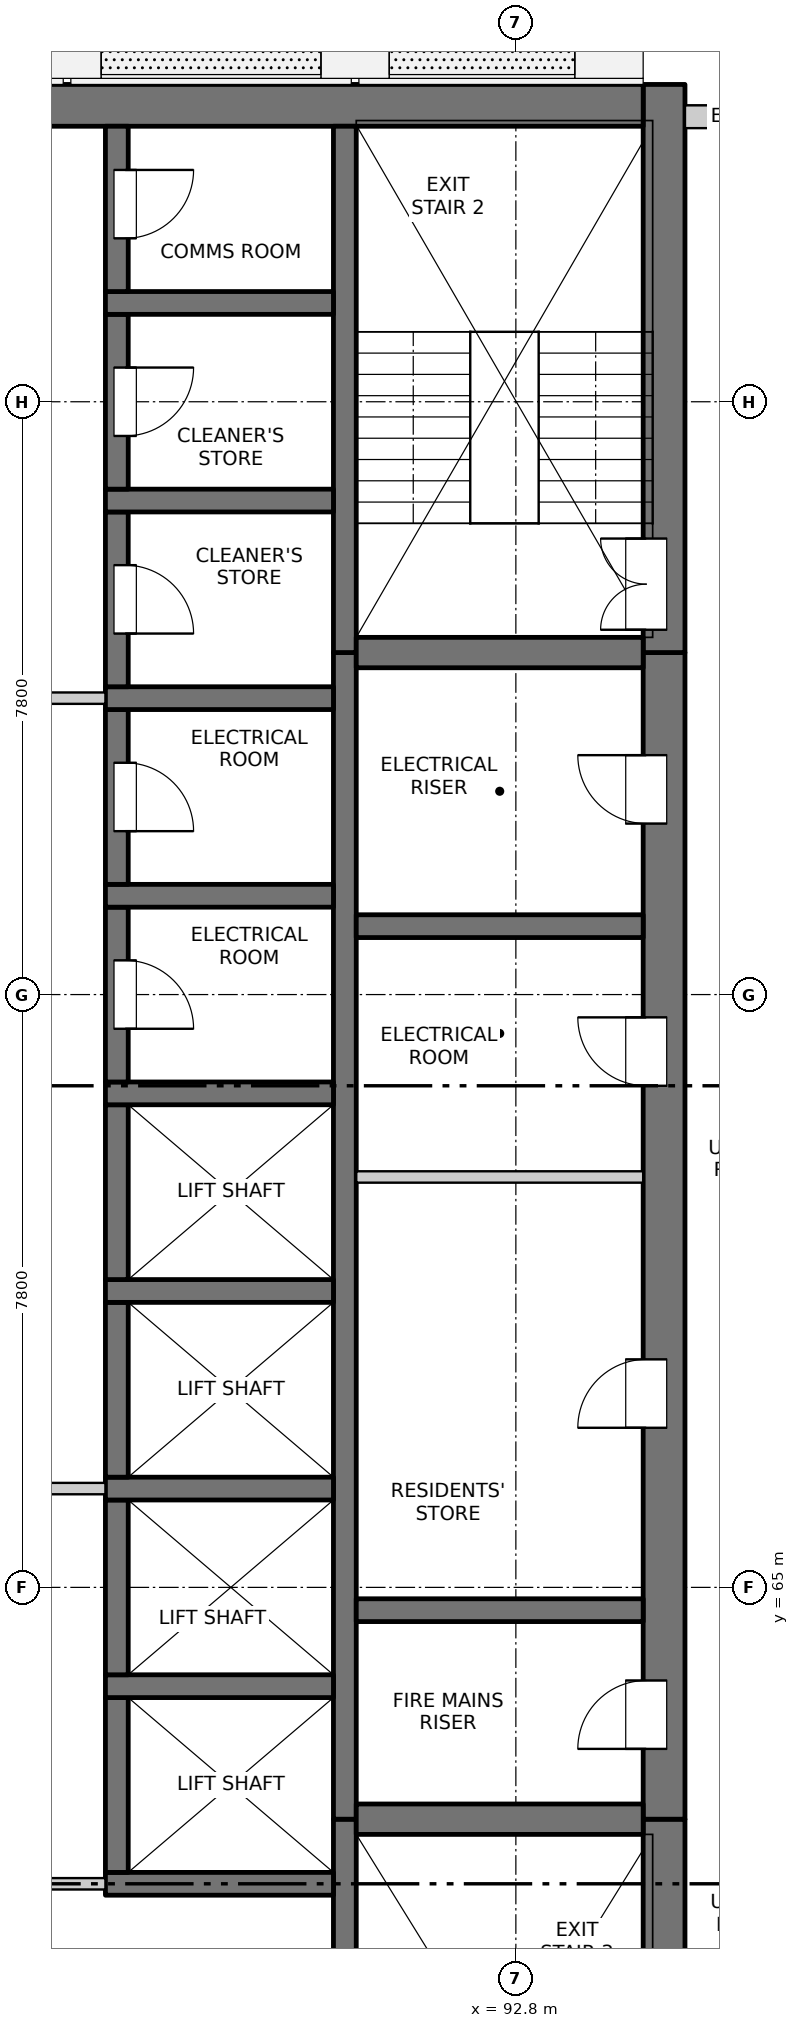
"""IFC4 building model, lengths in metres.
Left out: names, types, materials, properties, quantities, classifications, styles, units other than length and angle.
Written with IfcOpenShell. Run it as: python <this file> out.ifc"""

import sys

from ifc_helpers import new_model, si_unit, direction, frame, frame_2d, origin, place, context, subcontext, project, spatial, rectangle, extrude, element, fill, save


model = new_model("IFC4")
c1 = context("Model", 3, precision=1e-05, world=origin(), true_north=direction((0.0, 1.0)))
c2 = subcontext(c1, "Body", "Model", "MODEL_VIEW")
j1 = project(units=[si_unit("LENGTHUNIT", "METRE"), si_unit("PLANEANGLEUNIT", "RADIAN")], contexts=[c1])
p1 = place(None, origin())
s1 = spatial("IfcSite", under=j1, at=p1, CompositionType="ELEMENT")
p2 = place(p1, origin())
s2 = spatial("IfcBuilding", under=s1, at=p2, CompositionType="ELEMENT")
p3 = place(p2, frame((0.0, 0.0, 123.7)))
s3 = spatial("IfcBuildingStorey", under=s2, at=p3, CompositionType="ELEMENT", Elevation=123.7)
p4 = place(p3, frame((94.75, 54.975, -0.3), z_axis=(0.0, 0.0, 1.0), x_axis=(0.0, 1.0, 0.0)))
e1 = element("IfcWall", 1, at=p4, inside=s3, PredefinedType="SOLIDWALL", context=c2, shape_type="SweptSolid", body=[
    extrude(rectangle(XDim=6.975, YDim=0.55, at=frame_2d((3.487, 0.0))), origin(), (0.0, 0.0, 1.0), 3.45),
])
p5 = place(p4, frame((0.675, 0.0, 0.3)))
e2 = element("IfcOpeningElement", 2, at=p5, cuts=e1, PredefinedType="OPENING", context=c2, shape_type="SweptSolid", body=[
    extrude(rectangle(XDim=1.2, YDim=2.1, at=frame_2d((0.6, 1.05))), frame((0.0, 0.285, 0.0), z_axis=(0.0, -1.0, 0.0), x_axis=(1.0, 0.0, 0.0)), (0.0, 0.0, 1.0), 0.57),
])
p6 = place(p3, frame((94.75, 61.95, -0.3), z_axis=(0.0, 0.0, 1.0), x_axis=(0.0, 1.0, 0.0)))
e3 = element("IfcWall", 3, at=p6, inside=s3, PredefinedType="SOLIDWALL", context=c2, shape_type="SweptSolid", body=[
    extrude(rectangle(XDim=15.35, YDim=0.55, at=frame_2d((7.675, 0.0))), origin(), (0.0, 0.0, 1.0), 3.45),
])
p7 = place(p6, frame((0.925, 0.0, 0.3)))
e4 = element("IfcOpeningElement", 4, at=p7, cuts=e3, PredefinedType="OPENING", context=c2, shape_type="SweptSolid", body=[
    extrude(rectangle(XDim=0.9, YDim=2.1, at=frame_2d((0.45, 1.05))), frame((0.0, 0.285, 0.0), z_axis=(0.0, -1.0, 0.0), x_axis=(1.0, 0.0, 0.0)), (0.0, 0.0, 1.0), 0.57),
])
p8 = place(p6, frame((5.15, 0.0, 0.3)))
e5 = element("IfcOpeningElement", 5, at=p8, cuts=e3, PredefinedType="OPENING", context=c2, shape_type="SweptSolid", body=[
    extrude(rectangle(XDim=0.9, YDim=2.1, at=frame_2d((0.45, 1.05))), frame((0.0, 0.285, 0.0), z_axis=(0.0, -1.0, 0.0), x_axis=(1.0, 0.0, 0.0)), (0.0, 0.0, 1.0), 0.57),
])
p9 = place(p6, frame((9.65, 0.0, 0.3)))
e6 = element("IfcOpeningElement", 6, at=p9, cuts=e3, PredefinedType="OPENING", context=c2, shape_type="SweptSolid", body=[
    extrude(rectangle(XDim=0.9, YDim=2.1, at=frame_2d((0.45, 1.05))), frame((0.0, 0.285, 0.0), z_axis=(0.0, -1.0, 0.0), x_axis=(1.0, 0.0, 0.0)), (0.0, 0.0, 1.0), 0.57),
])
p10 = place(p6, frame((13.1, 0.0, 0.3)))
e7 = element("IfcOpeningElement", 7, at=p10, cuts=e3, PredefinedType="OPENING", context=c2, shape_type="SweptSolid", body=[
    extrude(rectangle(XDim=0.9, YDim=2.1, at=frame_2d((0.45, 1.05))), frame((0.0, 0.285, 0.0), z_axis=(0.0, -1.0, 0.0), x_axis=(1.0, 0.0, 0.0)), (0.0, 0.0, 1.0), 0.57),
])
p11 = place(p3, frame((94.75, 77.3, -0.3), z_axis=(0.0, 0.0, 1.0), x_axis=(0.0, 1.0, 0.0)))
e8 = element("IfcWall", 8, at=p11, inside=s3, PredefinedType="SOLIDWALL", context=c2, shape_type="SweptSolid", body=[
    extrude(rectangle(XDim=7.475, YDim=0.55, at=frame_2d((3.737, 0.0))), origin(), (0.0, 0.0, 1.0), 3.45),
])
p12 = place(p11, frame((0.3, 0.0, 0.3)))
e9 = element("IfcOpeningElement", 9, at=p12, cuts=e8, PredefinedType="OPENING", context=c2, shape_type="SweptSolid", body=[
    extrude(rectangle(XDim=1.2, YDim=2.1, at=frame_2d((0.6, 1.05))), frame((0.0, 0.285, 0.0), z_axis=(0.0, -1.0, 0.0), x_axis=(1.0, 0.0, 0.0)), (0.0, 0.0, 1.0), 0.57),
])
p13 = place(p3, frame((75.525, 84.5, -0.3), z_axis=(0.0, 0.0, 1.0), x_axis=(1.0, 0.0, 0.0)))
e10 = element("IfcWall", 10, at=p13, inside=s3, PredefinedType="SOLIDWALL", context=c2, shape_type="SweptSolid", body=[
    extrude(rectangle(XDim=18.95, YDim=0.55, at=frame_2d((9.475, 0.0))), origin(), (0.0, 0.0, 1.0), 3.45),
])
p14 = place(p3, frame((90.55, 55.525, -0.3), z_axis=(0.0, 0.0, 1.0), x_axis=(0.0, 1.0, 0.0)))
e11 = element("IfcWall", 11, at=p14, inside=s3, PredefinedType="SOLIDWALL", context=c2, shape_type="SweptSolid", body=[
    extrude(rectangle(XDim=6.425, YDim=0.3, at=frame_2d((3.212, 0.0))), origin(), (0.0, 0.0, 1.0), 3.45),
])
p15 = place(p3, frame((90.55, 61.95, -0.3), z_axis=(0.0, 0.0, 1.0), x_axis=(0.0, 1.0, 0.0)))
e12 = element("IfcWall", 12, at=p15, inside=s3, PredefinedType="SOLIDWALL", context=c2, shape_type="SweptSolid", body=[
    extrude(rectangle(XDim=15.35, YDim=0.3, at=frame_2d((7.675, 0.0))), origin(), (0.0, 0.0, 1.0), 3.45),
])
p16 = place(p3, frame((90.55, 77.3, -0.3), z_axis=(0.0, 0.0, 1.0), x_axis=(0.0, 1.0, 0.0)))
e13 = element("IfcWall", 13, at=p16, inside=s3, PredefinedType="SOLIDWALL", context=c2, shape_type="SweptSolid", body=[
    extrude(rectangle(XDim=6.925, YDim=0.3, at=frame_2d((3.462, 0.0))), origin(), (0.0, 0.0, 1.0), 3.45),
])
p17 = place(p3, frame((87.4, 61.1, -0.3), z_axis=(0.0, 0.0, 1.0), x_axis=(1.0, 0.0, 0.0)))
e14 = element("IfcWall", 14, at=p17, inside=s3, PredefinedType="SOLIDWALL", context=c2, shape_type="SweptSolid", body=[
    extrude(rectangle(XDim=3.0, YDim=0.3, at=frame_2d((1.5, 0.0))), origin(), (0.0, 0.0, 1.0), 3.45),
])
p18 = place(p3, frame((87.55, 61.25, -0.3), z_axis=(0.0, 0.0, 1.0), x_axis=(0.0, 1.0, 0.0)))
e15 = element("IfcWall", 15, at=p18, inside=s3, PredefinedType="SOLIDWALL", context=c2, shape_type="SweptSolid", body=[
    extrude(rectangle(XDim=2.3, YDim=0.3, at=frame_2d((1.15, 0.0))), origin(), (0.0, 0.0, 1.0), 3.45),
])
p19 = place(p3, frame((87.4, 63.7, -0.3), z_axis=(0.0, 0.0, 1.0), x_axis=(1.0, 0.0, 0.0)))
e16 = element("IfcWall", 16, at=p19, inside=s3, PredefinedType="SOLIDWALL", context=c2, shape_type="SweptSolid", body=[
    extrude(rectangle(XDim=3.0, YDim=0.3, at=frame_2d((1.5, 0.0))), origin(), (0.0, 0.0, 1.0), 3.45),
])
p20 = place(p3, frame((87.55, 63.85, -0.3), z_axis=(0.0, 0.0, 1.0), x_axis=(0.0, 1.0, 0.0)))
e17 = element("IfcWall", 17, at=p20, inside=s3, PredefinedType="SOLIDWALL", context=c2, shape_type="SweptSolid", body=[
    extrude(rectangle(XDim=2.3, YDim=0.3, at=frame_2d((1.15, 0.0))), origin(), (0.0, 0.0, 1.0), 3.45),
])
p21 = place(p3, frame((87.4, 66.3, -0.3), z_axis=(0.0, 0.0, 1.0), x_axis=(1.0, 0.0, 0.0)))
e18 = element("IfcWall", 18, at=p21, inside=s3, PredefinedType="SOLIDWALL", context=c2, shape_type="SweptSolid", body=[
    extrude(rectangle(XDim=3.0, YDim=0.3, at=frame_2d((1.5, 0.0))), origin(), (0.0, 0.0, 1.0), 3.45),
])
p22 = place(p3, frame((87.55, 66.45, -0.3), z_axis=(0.0, 0.0, 1.0), x_axis=(0.0, 1.0, 0.0)))
e19 = element("IfcWall", 19, at=p22, inside=s3, PredefinedType="SOLIDWALL", context=c2, shape_type="SweptSolid", body=[
    extrude(rectangle(XDim=2.3, YDim=0.3, at=frame_2d((1.15, 0.0))), origin(), (0.0, 0.0, 1.0), 3.45),
])
p23 = place(p3, frame((87.4, 68.9, -0.3), z_axis=(0.0, 0.0, 1.0), x_axis=(1.0, 0.0, 0.0)))
e20 = element("IfcWall", 20, at=p23, inside=s3, PredefinedType="SOLIDWALL", context=c2, shape_type="SweptSolid", body=[
    extrude(rectangle(XDim=3.0, YDim=0.3, at=frame_2d((1.5, 0.0))), origin(), (0.0, 0.0, 1.0), 3.45),
])
p24 = place(p3, frame((87.55, 69.05, -0.3), z_axis=(0.0, 0.0, 1.0), x_axis=(0.0, 1.0, 0.0)))
e21 = element("IfcWall", 21, at=p24, inside=s3, PredefinedType="SOLIDWALL", context=c2, shape_type="SweptSolid", body=[
    extrude(rectangle(XDim=2.3, YDim=0.3, at=frame_2d((1.15, 0.0))), origin(), (0.0, 0.0, 1.0), 3.45),
])
p25 = place(p3, frame((87.4, 71.5, -0.3), z_axis=(0.0, 0.0, 1.0), x_axis=(1.0, 0.0, 0.0)))
e22 = element("IfcWall", 22, at=p25, inside=s3, PredefinedType="SOLIDWALL", context=c2, shape_type="SweptSolid", body=[
    extrude(rectangle(XDim=3.0, YDim=0.3, at=frame_2d((1.5, 0.0))), origin(), (0.0, 0.0, 1.0), 3.45),
])
p26 = place(p3, frame((87.55, 71.65, -0.3), z_axis=(0.0, 0.0, 1.0), x_axis=(0.0, 1.0, 0.0)))
e23 = element("IfcWall", 23, at=p26, inside=s3, PredefinedType="SOLIDWALL", context=c2, shape_type="SweptSolid", body=[
    extrude(rectangle(XDim=2.3, YDim=0.3, at=frame_2d((1.15, 0.0))), origin(), (0.0, 0.0, 1.0), 3.45),
])
p27 = place(p26, frame((0.7, 0.0, 0.3)))
e24 = element("IfcOpeningElement", 24, at=p27, cuts=e23, PredefinedType="OPENING", context=c2, shape_type="SweptSolid", body=[
    extrude(rectangle(XDim=0.9, YDim=2.1, at=frame_2d((0.45, 1.05))), frame((0.0, 0.16, 0.0), z_axis=(0.0, -1.0, 0.0), x_axis=(1.0, 0.0, 0.0)), (0.0, 0.0, 1.0), 0.32),
])
p28 = place(p3, frame((87.4, 74.1, -0.3), z_axis=(0.0, 0.0, 1.0), x_axis=(1.0, 0.0, 0.0)))
e25 = element("IfcWall", 25, at=p28, inside=s3, PredefinedType="SOLIDWALL", context=c2, shape_type="SweptSolid", body=[
    extrude(rectangle(XDim=3.0, YDim=0.3, at=frame_2d((1.5, 0.0))), origin(), (0.0, 0.0, 1.0), 3.45),
])
p29 = place(p3, frame((87.55, 74.25, -0.3), z_axis=(0.0, 0.0, 1.0), x_axis=(0.0, 1.0, 0.0)))
e26 = element("IfcWall", 26, at=p29, inside=s3, PredefinedType="SOLIDWALL", context=c2, shape_type="SweptSolid", body=[
    extrude(rectangle(XDim=2.3, YDim=0.3, at=frame_2d((1.15, 0.0))), origin(), (0.0, 0.0, 1.0), 3.45),
])
p30 = place(p29, frame((0.7, 0.0, 0.3)))
e27 = element("IfcOpeningElement", 27, at=p30, cuts=e26, PredefinedType="OPENING", context=c2, shape_type="SweptSolid", body=[
    extrude(rectangle(XDim=0.9, YDim=2.1, at=frame_2d((0.45, 1.05))), frame((0.0, 0.16, 0.0), z_axis=(0.0, -1.0, 0.0), x_axis=(1.0, 0.0, 0.0)), (0.0, 0.0, 1.0), 0.32),
])
p31 = place(p3, frame((87.4, 76.7, -0.3), z_axis=(0.0, 0.0, 1.0), x_axis=(1.0, 0.0, 0.0)))
e28 = element("IfcWall", 28, at=p31, inside=s3, PredefinedType="SOLIDWALL", context=c2, shape_type="SweptSolid", body=[
    extrude(rectangle(XDim=3.0, YDim=0.3, at=frame_2d((1.5, 0.0))), origin(), (0.0, 0.0, 1.0), 3.45),
])
p32 = place(p3, frame((87.55, 76.85, -0.3), z_axis=(0.0, 0.0, 1.0), x_axis=(0.0, 1.0, 0.0)))
e29 = element("IfcWall", 29, at=p32, inside=s3, PredefinedType="SOLIDWALL", context=c2, shape_type="SweptSolid", body=[
    extrude(rectangle(XDim=2.3, YDim=0.3, at=frame_2d((1.15, 0.0))), origin(), (0.0, 0.0, 1.0), 3.45),
])
p33 = place(p32, frame((0.7, 0.0, 0.3)))
e30 = element("IfcOpeningElement", 30, at=p33, cuts=e29, PredefinedType="OPENING", context=c2, shape_type="SweptSolid", body=[
    extrude(rectangle(XDim=0.9, YDim=2.1, at=frame_2d((0.45, 1.05))), frame((0.0, 0.16, 0.0), z_axis=(0.0, -1.0, 0.0), x_axis=(1.0, 0.0, 0.0)), (0.0, 0.0, 1.0), 0.32),
])
p34 = place(p3, frame((87.4, 79.3, -0.3), z_axis=(0.0, 0.0, 1.0), x_axis=(1.0, 0.0, 0.0)))
e31 = element("IfcWall", 31, at=p34, inside=s3, PredefinedType="SOLIDWALL", context=c2, shape_type="SweptSolid", body=[
    extrude(rectangle(XDim=3.0, YDim=0.3, at=frame_2d((1.5, 0.0))), origin(), (0.0, 0.0, 1.0), 3.45),
])
p35 = place(p3, frame((87.55, 79.45, -0.3), z_axis=(0.0, 0.0, 1.0), x_axis=(0.0, 1.0, 0.0)))
e32 = element("IfcWall", 32, at=p35, inside=s3, PredefinedType="SOLIDWALL", context=c2, shape_type="SweptSolid", body=[
    extrude(rectangle(XDim=2.3, YDim=0.3, at=frame_2d((1.15, 0.0))), origin(), (0.0, 0.0, 1.0), 3.45),
])
p36 = place(p35, frame((0.7, 0.0, 0.3)))
e33 = element("IfcOpeningElement", 33, at=p36, cuts=e32, PredefinedType="OPENING", context=c2, shape_type="SweptSolid", body=[
    extrude(rectangle(XDim=0.9, YDim=2.1, at=frame_2d((0.45, 1.05))), frame((0.0, 0.16, 0.0), z_axis=(0.0, -1.0, 0.0), x_axis=(1.0, 0.0, 0.0)), (0.0, 0.0, 1.0), 0.32),
])
p37 = place(p3, frame((87.4, 81.9, -0.3), z_axis=(0.0, 0.0, 1.0), x_axis=(1.0, 0.0, 0.0)))
e34 = element("IfcWall", 34, at=p37, inside=s3, PredefinedType="SOLIDWALL", context=c2, shape_type="SweptSolid", body=[
    extrude(rectangle(XDim=3.0, YDim=0.3, at=frame_2d((1.5, 0.0))), origin(), (0.0, 0.0, 1.0), 3.45),
])
p38 = place(p3, frame((87.55, 82.05, -0.3), z_axis=(0.0, 0.0, 1.0), x_axis=(0.0, 1.0, 0.0)))
e35 = element("IfcWall", 35, at=p38, inside=s3, PredefinedType="SOLIDWALL", context=c2, shape_type="SweptSolid", body=[
    extrude(rectangle(XDim=2.175, YDim=0.3, at=frame_2d((1.087, 0.0))), origin(), (0.0, 0.0, 1.0), 3.45),
])
p39 = place(p38, frame((0.7, 0.0, 0.3)))
e36 = element("IfcOpeningElement", 36, at=p39, cuts=e35, PredefinedType="OPENING", context=c2, shape_type="SweptSolid", body=[
    extrude(rectangle(XDim=0.9, YDim=2.1, at=frame_2d((0.45, 1.05))), frame((0.0, 0.16, 0.0), z_axis=(0.0, -1.0, 0.0), x_axis=(1.0, 0.0, 0.0)), (0.0, 0.0, 1.0), 0.32),
])
p40 = place(p3, frame((90.7, 61.95, -0.3), z_axis=(0.0, 0.0, 1.0), x_axis=(1.0, 0.0, 0.0)))
e37 = element("IfcWall", 37, at=p40, inside=s3, PredefinedType="SOLIDWALL", context=c2, shape_type="SweptSolid", body=[
    extrude(rectangle(XDim=3.775, YDim=0.4, at=frame_2d((1.888, 0.0))), origin(), (0.0, 0.0, 1.0), 3.45),
])
for number, where, z_axis, x_axis in (
    (38, (90.7, 64.7, -0.3), (0.0, 0.0, 1.0), (1.0, 0.0, 0.0)),
    (39, (90.7, 73.7, -0.3), (0.0, 0.0, 1.0), (1.0, 0.0, 0.0)),
):
    element("IfcWall", number, at=place(p3, frame(where, z_axis=z_axis, x_axis=x_axis)), inside=s3, PredefinedType="SOLIDWALL", context=c2, shape_type="SweptSolid", body=[
        extrude(rectangle(XDim=3.775, YDim=0.3, at=frame_2d((1.888, 0.0))), origin(), (0.0, 0.0, 1.0), 3.45),
    ])
p41 = place(p3, frame((90.7, 77.3, -0.3), z_axis=(0.0, 0.0, 1.0), x_axis=(1.0, 0.0, 0.0)))
e40 = element("IfcWall", 40, at=p41, inside=s3, PredefinedType="SOLIDWALL", context=c2, shape_type="SweptSolid", body=[
    extrude(rectangle(XDim=3.775, YDim=0.4, at=frame_2d((1.888, 0.0))), origin(), (0.0, 0.0, 1.0), 3.45),
])
p42 = place(p3, frame((95.025, 84.35, 0.0), z_axis=(0.0, 0.0, 1.0), x_axis=(1.0, 0.0, 0.0)))
e41 = element("IfcWall", 41, at=p42, inside=s3, PredefinedType="SOLIDWALL", context=c2, shape_type="SweptSolid", body=[
    extrude(rectangle(XDim=1.25, YDim=0.3, at=frame_2d((0.625, 0.0))), origin(), (0.0, 0.0, 1.0), 2.7),
])
p43 = place(p3, frame((82.6, 61.1, 0.0), z_axis=(0.0, 0.0, 1.0), x_axis=(1.0, 0.0, 0.0)))
e42 = element("IfcWall", 42, at=p43, inside=s3, PredefinedType="PARTITIONING", context=c2, shape_type="SweptSolid", body=[
    extrude(rectangle(XDim=4.8, YDim=0.15, at=frame_2d((2.4, 0.0))), origin(), (0.0, 0.0, 1.0), 3.15),
])
p44 = place(p43, frame((1.5, 0.0, 0.0)))
e43 = element("IfcOpeningElement", 43, at=p44, cuts=e42, PredefinedType="OPENING", context=c2, shape_type="SweptSolid", body=[
    extrude(rectangle(XDim=1.8, YDim=2.1, at=frame_2d((0.9, 1.05))), frame((0.0, 0.085, 0.0), z_axis=(0.0, -1.0, 0.0), x_axis=(1.0, 0.0, 0.0)), (0.0, 0.0, 1.0), 0.17),
])
p45 = place(p3, frame((82.6, 66.3, 0.0), z_axis=(0.0, 0.0, 1.0), x_axis=(1.0, 0.0, 0.0)))
e44 = element("IfcWall", 44, at=p45, inside=s3, PredefinedType="PARTITIONING", context=c2, shape_type="SweptSolid", body=[
    extrude(rectangle(XDim=4.8, YDim=0.15, at=frame_2d((2.4, 0.0))), origin(), (0.0, 0.0, 1.0), 3.15),
])
p46 = place(p45, frame((1.5, 0.0, 0.0)))
e45 = element("IfcOpeningElement", 45, at=p46, cuts=e44, PredefinedType="OPENING", context=c2, shape_type="SweptSolid", body=[
    extrude(rectangle(XDim=1.8, YDim=2.1, at=frame_2d((0.9, 1.05))), frame((0.0, 0.085, 0.0), z_axis=(0.0, -1.0, 0.0), x_axis=(1.0, 0.0, 0.0)), (0.0, 0.0, 1.0), 0.17),
])
p47 = place(p3, frame((90.7, 70.4, 0.0), z_axis=(0.0, 0.0, 1.0), x_axis=(1.0, 0.0, 0.0)))
e46 = element("IfcWall", 46, at=p47, inside=s3, PredefinedType="PARTITIONING", context=c2, shape_type="SweptSolid", body=[
    extrude(rectangle(XDim=3.775, YDim=0.15, at=frame_2d((1.887, 0.0))), origin(), (0.0, 0.0, 1.0), 3.15),
])
p48 = place(p3, frame((82.6, 76.7, 0.0), z_axis=(0.0, 0.0, 1.0), x_axis=(1.0, 0.0, 0.0)))
e47 = element("IfcWall", 47, at=p48, inside=s3, PredefinedType="PARTITIONING", context=c2, shape_type="SweptSolid", body=[
    extrude(rectangle(XDim=4.8, YDim=0.15, at=frame_2d((2.4, 0.0))), origin(), (0.0, 0.0, 1.0), 3.15),
])
p49 = place(p48, frame((1.5, 0.0, 0.0)))
e48 = element("IfcOpeningElement", 48, at=p49, cuts=e47, PredefinedType="OPENING", context=c2, shape_type="SweptSolid", body=[
    extrude(rectangle(XDim=1.8, YDim=2.1, at=frame_2d((0.9, 1.05))), frame((0.0, 0.085, 0.0), z_axis=(0.0, -1.0, 0.0), x_axis=(1.0, 0.0, 0.0)), (0.0, 0.0, 1.0), 0.17),
])
p50 = place(p7, origin())
e49 = element("IfcDoor", 49, at=p50, inside=s3, OperationType="SINGLE_SWING_LEFT", PredefinedType="DOOR", context=c2, shape_type="SweptSolid", body=[
    extrude(rectangle(XDim=0.9, YDim=2.1, at=frame_2d((0.45, 1.05))), frame((0.0, 0.26, 0.0), z_axis=(0.0, -1.0, 0.0), x_axis=(1.0, 0.0, 0.0)), (0.0, 0.0, 1.0), 0.05),
])
fill(e4, e49)
p51 = place(p8, origin())
e50 = element("IfcDoor", 50, at=p51, inside=s3, OperationType="SINGLE_SWING_LEFT", PredefinedType="DOOR", context=c2, shape_type="SweptSolid", body=[
    extrude(rectangle(XDim=0.9, YDim=2.1, at=frame_2d((0.45, 1.05))), frame((0.0, 0.26, 0.0), z_axis=(0.0, -1.0, 0.0), x_axis=(1.0, 0.0, 0.0)), (0.0, 0.0, 1.0), 0.05),
])
fill(e5, e50)
p52 = place(p9, origin())
e51 = element("IfcDoor", 51, at=p52, inside=s3, OperationType="SINGLE_SWING_RIGHT", PredefinedType="DOOR", context=c2, shape_type="SweptSolid", body=[
    extrude(rectangle(XDim=0.9, YDim=2.1, at=frame_2d((0.45, 1.05))), frame((0.0, 0.26, 0.0), z_axis=(0.0, -1.0, 0.0), x_axis=(1.0, 0.0, 0.0)), (0.0, 0.0, 1.0), 0.05),
])
fill(e6, e51)
p53 = place(p27, origin())
e52 = element("IfcDoor", 52, at=p53, inside=s3, OperationType="SINGLE_SWING_RIGHT", PredefinedType="DOOR", context=c2, shape_type="SweptSolid", body=[
    extrude(rectangle(XDim=0.9, YDim=2.1, at=frame_2d((0.45, 1.05))), frame((0.0, -0.085, 0.0), z_axis=(0.0, -1.0, 0.0), x_axis=(1.0, 0.0, 0.0)), (0.0, 0.0, 1.0), 0.05),
])
fill(e24, e52)
p54 = place(p30, origin())
e53 = element("IfcDoor", 53, at=p54, inside=s3, OperationType="SINGLE_SWING_RIGHT", PredefinedType="DOOR", context=c2, shape_type="SweptSolid", body=[
    extrude(rectangle(XDim=0.9, YDim=2.1, at=frame_2d((0.45, 1.05))), frame((0.0, -0.085, 0.0), z_axis=(0.0, -1.0, 0.0), x_axis=(1.0, 0.0, 0.0)), (0.0, 0.0, 1.0), 0.05),
])
fill(e27, e53)
p55 = place(p10, origin())
e54 = element("IfcDoor", 54, at=p55, inside=s3, OperationType="SINGLE_SWING_RIGHT", PredefinedType="DOOR", context=c2, shape_type="SweptSolid", body=[
    extrude(rectangle(XDim=0.9, YDim=2.1, at=frame_2d((0.45, 1.05))), frame((0.0, 0.26, 0.0), z_axis=(0.0, -1.0, 0.0), x_axis=(1.0, 0.0, 0.0)), (0.0, 0.0, 1.0), 0.05),
])
fill(e7, e54)
p56 = place(p33, origin())
e55 = element("IfcDoor", 55, at=p56, inside=s3, OperationType="SINGLE_SWING_RIGHT", PredefinedType="DOOR", context=c2, shape_type="SweptSolid", body=[
    extrude(rectangle(XDim=0.9, YDim=2.1, at=frame_2d((0.45, 1.05))), frame((0.0, -0.085, 0.0), z_axis=(0.0, -1.0, 0.0), x_axis=(1.0, 0.0, 0.0)), (0.0, 0.0, 1.0), 0.05),
])
fill(e30, e55)
p57 = place(p12, origin())
e56 = element("IfcDoor", 56, at=p57, inside=s3, OperationType="DOUBLE_DOOR_SINGLE_SWING", PredefinedType="DOOR", context=c2, shape_type="SweptSolid", body=[
    extrude(rectangle(XDim=1.2, YDim=2.1, at=frame_2d((0.6, 1.05))), frame((0.0, 0.26, 0.0), z_axis=(0.0, -1.0, 0.0), x_axis=(1.0, 0.0, 0.0)), (0.0, 0.0, 1.0), 0.05),
])
fill(e9, e56)
p58 = place(p36, origin())
e57 = element("IfcDoor", 57, at=p58, inside=s3, OperationType="SINGLE_SWING_LEFT", PredefinedType="DOOR", context=c2, shape_type="SweptSolid", body=[
    extrude(rectangle(XDim=0.9, YDim=2.1, at=frame_2d((0.45, 1.05))), frame((0.0, -0.085, 0.0), z_axis=(0.0, -1.0, 0.0), x_axis=(1.0, 0.0, 0.0)), (0.0, 0.0, 1.0), 0.05),
])
fill(e33, e57)
p59 = place(p39, origin())
e58 = element("IfcDoor", 58, at=p59, inside=s3, OperationType="SINGLE_SWING_LEFT", PredefinedType="DOOR", context=c2, shape_type="SweptSolid", body=[
    extrude(rectangle(XDim=0.9, YDim=2.1, at=frame_2d((0.45, 1.05))), frame((0.0, -0.085, 0.0), z_axis=(0.0, -1.0, 0.0), x_axis=(1.0, 0.0, 0.0)), (0.0, 0.0, 1.0), 0.05),
])
fill(e36, e58)
save(model, sys.argv[1])
